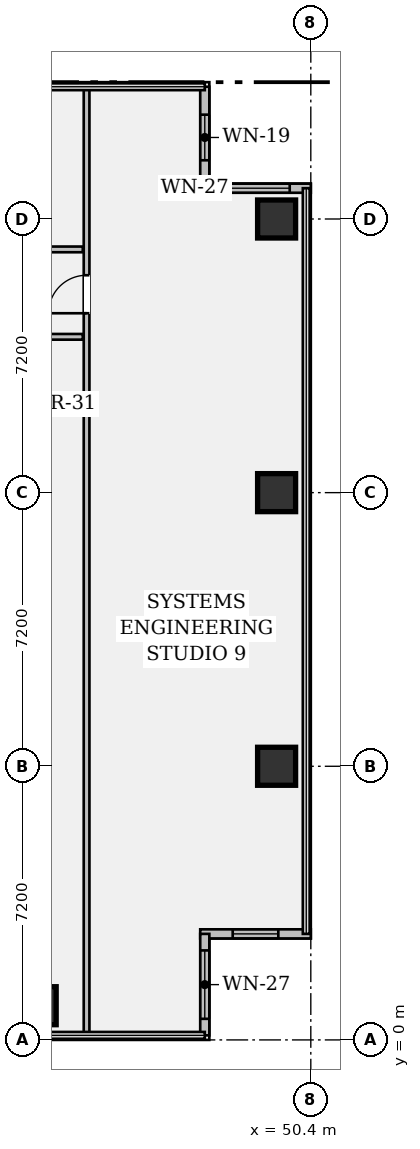
"""IFC4 building model, lengths in metres.
Left out: names, types, materials, properties, quantities, classifications, styles, units other than length and angle.
Written with IfcOpenShell. Run it as: python <this file> out.ifc"""

import sys

from ifc_helpers import new_model, si_unit, direction, frame, frame_2d, origin, origin_2d, place, context, subcontext, project, spatial, rectangle, hollow_rectangle, extrude, element, fill, save


model = new_model("IFC4")
c1 = context("Model", 3, precision=1e-05, world=origin(), true_north=direction((0.0, 1.0)))
c2 = subcontext(c1, "Body", "Model", "MODEL_VIEW")
j1 = project(units=[si_unit("LENGTHUNIT", "METRE"), si_unit("PLANEANGLEUNIT", "RADIAN")], contexts=[c1])
p1 = place(None, origin())
s1 = spatial("IfcSite", under=j1, at=p1, CompositionType="ELEMENT")
p2 = place(p1, origin())
s2 = spatial("IfcBuilding", under=s1, at=p2, CompositionType="ELEMENT")
p3 = place(p2, frame((0.0, 0.0, 58.1)))
s3 = spatial("IfcBuildingStorey", under=s2, at=p3, CompositionType="ELEMENT", Elevation=58.1)
for number, where, z_axis, x_axis in (
    (1, (43.2, 0.9, 0.0), (0.0, 0.0, 1.0), (1.0, 0.0, 0.0)),
    (2, (49.5, 7.2, 0.0), (0.0, 0.0, 1.0), (1.0, 0.0, 0.0)),
    (3, (49.5, 14.4, 0.0), (0.0, 0.0, 1.0), (1.0, 0.0, 0.0)),
    (4, (49.5, 21.6, 0.0), (0.0, 0.0, 1.0), (1.0, 0.0, 0.0)),
):
    element("IfcColumn", number, at=place(p3, frame(where, z_axis=z_axis, x_axis=x_axis)), inside=s3, PredefinedType="COLUMN", context=c2, shape_type="SweptSolid", body=[
        extrude(hollow_rectangle(XDim=1.0, YDim=1.0, WallThickness=0.065, at=origin_2d()), origin(), (0.0, 0.0, 1.0), 3.57),
    ])
p4 = place(p3, frame((47.61, 25.08, 0.0), z_axis=(0.0, 0.0, 1.0), x_axis=(0.0, -1.0, 0.0)))
e5 = element("IfcWall", 5, at=p4, inside=s3, PredefinedType="STANDARD", context=c2, shape_type="SweptSolid", body=[
    extrude(rectangle(XDim=2.67, YDim=0.24, at=frame_2d((1.335, 0.0))), origin(), (0.0, 0.0, 1.0), 3.57),
])
p5 = place(p4, frame((0.735, 0.0, 0.95)))
e6 = element("IfcOpeningElement", 6, at=p5, cuts=e5, PredefinedType="OPENING", context=c2, shape_type="SweptSolid", body=[
    extrude(rectangle(XDim=1.2, YDim=1.8, at=frame_2d((0.6, 0.9))), frame((0.0, 0.132, 0.0), z_axis=(0.0, -1.0, 0.0), x_axis=(1.0, 0.0, 0.0)), (0.0, 0.0, 1.0), 0.264),
])
p6 = place(p3, frame((47.49, 22.41, 0.0), z_axis=(0.0, 0.0, 1.0), x_axis=(1.0, 0.0, 0.0)))
e7 = element("IfcWall", 7, at=p6, inside=s3, PredefinedType="STANDARD", context=c2, shape_type="SweptSolid", body=[
    extrude(rectangle(XDim=2.91, YDim=0.24, at=frame_2d((1.455, 0.0))), origin(), (0.0, 0.0, 1.0), 3.57),
])
p7 = place(p6, frame((0.555, 0.0, 0.95)))
e8 = element("IfcOpeningElement", 8, at=p7, cuts=e7, PredefinedType="OPENING", context=c2, shape_type="SweptSolid", body=[
    extrude(rectangle(XDim=1.8, YDim=1.35, at=frame_2d((0.9, 0.675))), frame((0.0, 0.132, 0.0), z_axis=(0.0, -1.0, 0.0), x_axis=(1.0, 0.0, 0.0)), (0.0, 0.0, 1.0), 0.264),
])
p8 = place(p3, frame((50.4, 2.79, 0.0), z_axis=(0.0, 0.0, 1.0), x_axis=(-1.0, 0.0, 0.0)))
e9 = element("IfcWall", 9, at=p8, inside=s3, PredefinedType="STANDARD", context=c2, shape_type="SweptSolid", body=[
    extrude(rectangle(XDim=2.91, YDim=0.24, at=frame_2d((1.455, 0.0))), origin(), (0.0, 0.0, 1.0), 3.57),
])
p9 = place(p8, frame((0.855, 0.0, 0.95)))
e10 = element("IfcOpeningElement", 10, at=p9, cuts=e9, PredefinedType="OPENING", context=c2, shape_type="SweptSolid", body=[
    extrude(rectangle(XDim=1.2, YDim=1.8, at=frame_2d((0.6, 0.9))), frame((0.0, 0.132, 0.0), z_axis=(0.0, -1.0, 0.0), x_axis=(1.0, 0.0, 0.0)), (0.0, 0.0, 1.0), 0.264),
])
p10 = place(p3, frame((47.61, 2.79, 0.0), z_axis=(0.0, 0.0, 1.0), x_axis=(0.0, -1.0, 0.0)))
e11 = element("IfcWall", 11, at=p10, inside=s3, PredefinedType="STANDARD", context=c2, shape_type="SweptSolid", body=[
    extrude(rectangle(XDim=2.67, YDim=0.24, at=frame_2d((1.335, 0.0))), origin(), (0.0, 0.0, 1.0), 3.57),
])
p11 = place(p10, frame((0.435, 0.0, 0.95)))
e12 = element("IfcOpeningElement", 12, at=p11, cuts=e11, PredefinedType="OPENING", context=c2, shape_type="SweptSolid", body=[
    extrude(rectangle(XDim=1.8, YDim=1.35, at=frame_2d((0.9, 0.675))), frame((0.0, 0.132, 0.0), z_axis=(0.0, -1.0, 0.0), x_axis=(1.0, 0.0, 0.0)), (0.0, 0.0, 1.0), 0.264),
])
p12 = place(p3, frame((17.35, 18.5, 0.0), z_axis=(0.0, 0.0, 1.0), x_axis=(1.0, 0.0, 0.0)))
e13 = element("IfcWall", 13, at=p12, inside=s3, PredefinedType="PARTITIONING", context=c2, shape_type="SweptSolid", body=[
    extrude(rectangle(XDim=27.05, YDim=0.15, at=frame_2d((13.525, 0.0))), origin(), (0.0, 0.0, 1.0), 2.699),
])
p13 = place(p12, frame((2.52, 0.0, 0.0)))
e14 = element("IfcOpeningElement", 14, at=p13, cuts=e13, PredefinedType="OPENING", context=c2, shape_type="SweptSolid", body=[
    extrude(rectangle(XDim=0.95, YDim=2.15, at=frame_2d((0.475, 1.075))), frame((0.0, 0.087, 0.0), z_axis=(0.0, -1.0, 0.0), x_axis=(1.0, 0.0, 0.0)), (0.0, 0.0, 1.0), 0.174),
])
p14 = place(p12, frame((9.15, 0.0, 0.0)))
e15 = element("IfcOpeningElement", 15, at=p14, cuts=e13, PredefinedType="OPENING", context=c2, shape_type="SweptSolid", body=[
    extrude(rectangle(XDim=0.95, YDim=2.15, at=frame_2d((0.475, 1.075))), frame((0.0, 0.087, 0.0), z_axis=(0.0, -1.0, 0.0), x_axis=(1.0, 0.0, 0.0)), (0.0, 0.0, 1.0), 0.174),
])
p15 = place(p12, frame((16.35, 0.0, 0.0)))
e16 = element("IfcOpeningElement", 16, at=p15, cuts=e13, PredefinedType="OPENING", context=c2, shape_type="SweptSolid", body=[
    extrude(rectangle(XDim=0.95, YDim=2.15, at=frame_2d((0.475, 1.075))), frame((0.0, 0.087, 0.0), z_axis=(0.0, -1.0, 0.0), x_axis=(1.0, 0.0, 0.0)), (0.0, 0.0, 1.0), 0.174),
])
p16 = place(p12, frame((23.25, 0.0, 0.0)))
e17 = element("IfcOpeningElement", 17, at=p16, cuts=e13, PredefinedType="OPENING", context=c2, shape_type="SweptSolid", body=[
    extrude(rectangle(XDim=0.95, YDim=2.15, at=frame_2d((0.475, 1.075))), frame((0.0, 0.087, 0.0), z_axis=(0.0, -1.0, 0.0), x_axis=(1.0, 0.0, 0.0)), (0.0, 0.0, 1.0), 0.174),
])
p17 = place(p3, frame((17.35, 20.8, 0.0), z_axis=(0.0, 0.0, 1.0), x_axis=(1.0, 0.0, 0.0)))
e18 = element("IfcWall", 18, at=p17, inside=s3, PredefinedType="PARTITIONING", context=c2, shape_type="SweptSolid", body=[
    extrude(rectangle(XDim=27.05, YDim=0.15, at=frame_2d((13.525, 0.0))), origin(), (0.0, 0.0, 1.0), 2.699),
])
p18 = place(p17, frame((6.32, 0.0, 0.0)))
e19 = element("IfcOpeningElement", 19, at=p18, cuts=e18, PredefinedType="OPENING", context=c2, shape_type="SweptSolid", body=[
    extrude(rectangle(XDim=0.95, YDim=2.15, at=frame_2d((0.475, 1.075))), frame((0.0, 0.087, 0.0), z_axis=(0.0, -1.0, 0.0), x_axis=(1.0, 0.0, 0.0)), (0.0, 0.0, 1.0), 0.174),
])
p19 = place(p17, frame((20.01, 0.0, 0.0)))
e20 = element("IfcOpeningElement", 20, at=p19, cuts=e18, PredefinedType="OPENING", context=c2, shape_type="SweptSolid", body=[
    extrude(rectangle(XDim=0.95, YDim=2.15, at=frame_2d((0.475, 1.075))), frame((0.0, 0.087, 0.0), z_axis=(0.0, -1.0, 0.0), x_axis=(1.0, 0.0, 0.0)), (0.0, 0.0, 1.0), 0.174),
])
p20 = place(p3, frame((44.5, 0.12, 0.0), z_axis=(0.0, 0.0, 1.0), x_axis=(0.0, 1.0, 0.0)))
e21 = element("IfcWall", 21, at=p20, inside=s3, PredefinedType="PARTITIONING", context=c2, shape_type="SweptSolid", body=[
    extrude(rectangle(XDim=24.96, YDim=0.15, at=frame_2d((12.48, 0.0))), origin(), (0.0, 0.0, 1.0), 2.699),
])
p21 = place(p20, frame((19.0, 0.0, 0.0)))
e22 = element("IfcOpeningElement", 22, at=p21, cuts=e21, PredefinedType="OPENING", context=c2, shape_type="SweptSolid", body=[
    extrude(rectangle(XDim=1.0, YDim=2.15, at=frame_2d((0.5, 1.075))), frame((0.0, 0.087, 0.0), z_axis=(0.0, -1.0, 0.0), x_axis=(1.0, 0.0, 0.0)), (0.0, 0.0, 1.0), 0.174),
])
p22 = place(p5, origin())
e23 = element("IfcWindow", 23, at=p22, inside=s3, PartitioningType="SINGLE_PANEL", PredefinedType="WINDOW", context=c2, shape_type="SweptSolid", body=[
    extrude(rectangle(XDim=1.2, YDim=1.8, at=frame_2d((0.6, 0.9))), frame((0.0, 0.03, 0.0), z_axis=(0.0, -1.0, 0.0), x_axis=(1.0, 0.0, 0.0)), (0.0, 0.0, 1.0), 0.06),
])
fill(e6, e23)
p23 = place(p7, origin())
e24 = element("IfcWindow", 24, at=p23, inside=s3, PartitioningType="SINGLE_PANEL", PredefinedType="WINDOW", context=c2, shape_type="SweptSolid", body=[
    extrude(rectangle(XDim=1.8, YDim=1.35, at=frame_2d((0.9, 0.675))), frame((0.0, 0.03, 0.0), z_axis=(0.0, -1.0, 0.0), x_axis=(1.0, 0.0, 0.0)), (0.0, 0.0, 1.0), 0.06),
])
fill(e8, e24)
p24 = place(p9, origin())
e25 = element("IfcWindow", 25, at=p24, inside=s3, PartitioningType="SINGLE_PANEL", PredefinedType="WINDOW", context=c2, shape_type="SweptSolid", body=[
    extrude(rectangle(XDim=1.2, YDim=1.8, at=frame_2d((0.6, 0.9))), frame((0.0, 0.03, 0.0), z_axis=(0.0, -1.0, 0.0), x_axis=(1.0, 0.0, 0.0)), (0.0, 0.0, 1.0), 0.06),
])
fill(e10, e25)
p25 = place(p11, origin())
e26 = element("IfcWindow", 26, at=p25, inside=s3, PartitioningType="SINGLE_PANEL", PredefinedType="WINDOW", context=c2, shape_type="SweptSolid", body=[
    extrude(rectangle(XDim=1.8, YDim=1.35, at=frame_2d((0.9, 0.675))), frame((0.0, 0.03, 0.0), z_axis=(0.0, -1.0, 0.0), x_axis=(1.0, 0.0, 0.0)), (0.0, 0.0, 1.0), 0.06),
])
fill(e12, e26)
p26 = place(p21, origin())
e27 = element("IfcDoor", 27, at=p26, inside=s3, OperationType="SINGLE_SWING_LEFT", PredefinedType="DOOR", context=c2, shape_type="SweptSolid", body=[
    extrude(rectangle(XDim=1.0, YDim=2.15, at=frame_2d((0.5, 1.075))), frame((0.0, 0.025, 0.0), z_axis=(0.0, -1.0, 0.0), x_axis=(1.0, 0.0, 0.0)), (0.0, 0.0, 1.0), 0.05),
])
fill(e22, e27)
save(model, sys.argv[1])
